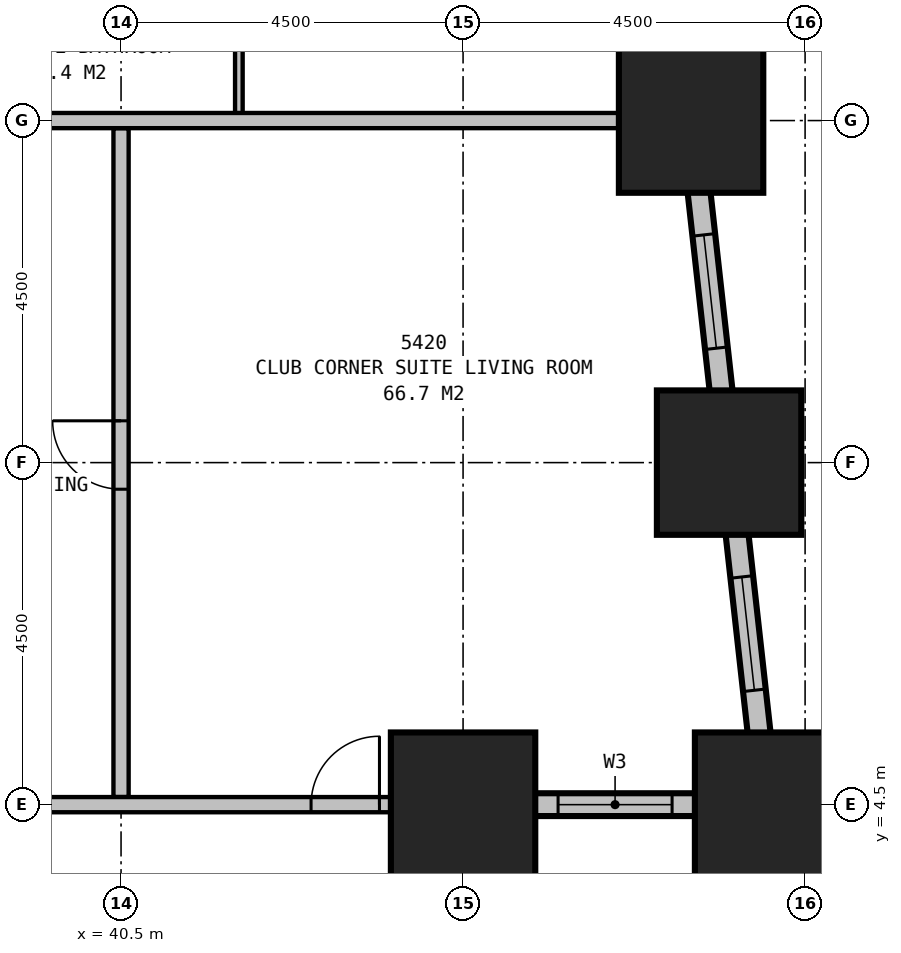
"""IFC4 building model, lengths in metres.
Left out: names, types, materials, properties, quantities, classifications, styles, units other than length and angle.
Written with IfcOpenShell. Run it as: python <this file> out.ifc"""

import sys

from ifc_helpers import new_model, si_unit, direction, frame, frame_2d, origin, origin_2d, place, context, subcontext, project, spatial, rectangle, extrude, element, fill, save


model = new_model("IFC4")
c1 = context("Model", 3, precision=1e-05, world=origin(), true_north=direction((0.0, 1.0)))
c2 = subcontext(c1, "Body", "Model", "MODEL_VIEW")
j1 = project(units=[si_unit("LENGTHUNIT", "METRE"), si_unit("PLANEANGLEUNIT", "RADIAN")], contexts=[c1])
p1 = place(None, origin())
s1 = spatial("IfcSite", under=j1, at=p1, CompositionType="ELEMENT")
p2 = place(p1, origin())
s2 = spatial("IfcBuilding", under=s1, at=p2, CompositionType="ELEMENT")
p3 = place(p2, frame((0.0, 0.0, 207.9)))
s3 = spatial("IfcBuildingStorey", under=s2, at=p3, CompositionType="ELEMENT", Elevation=207.9)
for number, where, z_axis, x_axis in (
    (1, (45.0, 4.5, 0.0), (0.0, 0.0, 1.0), (1.0, 0.0, 0.0)),
    (2, (49.0, 4.5, 0.0), (0.0, 0.0, 1.0), (1.0, 0.0, 0.0)),
    (3, (48.5, 9.0, 0.0), (0.0, 0.0, 1.0), (1.0, 0.0, 0.0)),
    (4, (48.0, 13.5, 0.0), (0.0, 0.0, 1.0), (1.0, 0.0, 0.0)),
):
    element("IfcColumn", number, at=place(p3, frame(where, z_axis=z_axis, x_axis=x_axis)), inside=s3, PredefinedType="COLUMN", context=c2, shape_type="SweptSolid", body=[
        extrude(rectangle(XDim=1.9, YDim=1.9, at=origin_2d()), origin(), (0.0, 0.0, 1.0), 3.5),
    ])
p4 = place(p3, frame((45.0, -0.15, 0.0), z_axis=(0.0, 0.0, 1.0), x_axis=(0.0, 1.0, 0.0)))
e5 = element("IfcWall", 5, at=p4, inside=s3, PredefinedType="STANDARD", context=c2, shape_type="SweptSolid", body=[
    extrude(rectangle(XDim=4.8, YDim=0.3, at=frame_2d((2.4, 0.0))), origin(), (0.0, 0.0, 1.0), 1.9),
])
p5 = place(p4, frame((1.65, 0.0, 0.5)))
e6 = element("IfcOpeningElement", 6, at=p5, cuts=e5, PredefinedType="OPENING", context=c2, shape_type="SweptSolid", body=[
    extrude(rectangle(XDim=1.5, YDim=1.2, at=frame_2d((0.75, 0.6))), frame((0.0, 0.16, 0.0), z_axis=(0.0, -1.0, 0.0), x_axis=(1.0, 0.0, 0.0)), (0.0, 0.0, 1.0), 0.32),
])
p6 = place(p3, frame((44.85, 4.5, 0.0), z_axis=(0.0, 0.0, 1.0), x_axis=(1.0, 0.0, 0.0)))
e7 = element("IfcWall", 7, at=p6, inside=s3, PredefinedType="STANDARD", context=c2, shape_type="SweptSolid", body=[
    extrude(rectangle(XDim=4.3, YDim=0.3, at=frame_2d((2.15, 0.0))), origin(), (0.0, 0.0, 1.0), 1.9),
])
p7 = place(p6, frame((1.4, 0.0, 0.5)))
e8 = element("IfcOpeningElement", 8, at=p7, cuts=e7, PredefinedType="OPENING", context=c2, shape_type="SweptSolid", body=[
    extrude(rectangle(XDim=1.5, YDim=1.2, at=frame_2d((0.75, 0.6))), frame((0.0, 0.16, 0.0), z_axis=(0.0, -1.0, 0.0), x_axis=(1.0, 0.0, 0.0)), (0.0, 0.0, 1.0), 0.32),
])
p8 = place(p3, frame((49.017, 4.351, 0.0), z_axis=(0.0, 0.0, 1.0), x_axis=(-0.110433201132, 0.993883548555, 0.0)))
e9 = element("IfcWall", 9, at=p8, inside=s3, PredefinedType="STANDARD", context=c2, shape_type="SweptSolid", body=[
    extrude(rectangle(XDim=31.994, YDim=0.3, at=frame_2d((15.997, 0.0))), origin(), (0.0, 0.0, 1.0), 1.9),
])
p9 = place(p8, frame((1.664, 0.0, 0.5)))
e10 = element("IfcOpeningElement", 10, at=p9, cuts=e9, PredefinedType="OPENING", context=c2, shape_type="SweptSolid", body=[
    extrude(rectangle(XDim=1.5, YDim=1.2, at=frame_2d((0.75, 0.6))), frame((0.0, 0.16, 0.0), z_axis=(0.0, -1.0, 0.0), x_axis=(1.0, 0.0, 0.0)), (0.0, 0.0, 1.0), 0.32),
])
p10 = place(p8, frame((6.192, 0.0, 0.5)))
e11 = element("IfcOpeningElement", 11, at=p10, cuts=e9, PredefinedType="OPENING", context=c2, shape_type="SweptSolid", body=[
    extrude(rectangle(XDim=1.5, YDim=1.2, at=frame_2d((0.75, 0.6))), frame((0.0, 0.16, 0.0), z_axis=(0.0, -1.0, 0.0), x_axis=(1.0, 0.0, 0.0)), (0.0, 0.0, 1.0), 0.32),
])
p11 = place(p8, frame((10.719, 0.0, 0.5)))
e12 = element("IfcOpeningElement", 12, at=p11, cuts=e9, PredefinedType="OPENING", context=c2, shape_type="SweptSolid", body=[
    extrude(rectangle(XDim=1.5, YDim=1.2, at=frame_2d((0.75, 0.6))), frame((0.0, 0.16, 0.0), z_axis=(0.0, -1.0, 0.0), x_axis=(1.0, 0.0, 0.0)), (0.0, 0.0, 1.0), 0.32),
])
p12 = place(p8, frame((15.247, 0.0, 0.5)))
e13 = element("IfcOpeningElement", 13, at=p12, cuts=e9, PredefinedType="OPENING", context=c2, shape_type="SweptSolid", body=[
    extrude(rectangle(XDim=1.5, YDim=1.2, at=frame_2d((0.75, 0.6))), frame((0.0, 0.16, 0.0), z_axis=(0.0, -1.0, 0.0), x_axis=(1.0, 0.0, 0.0)), (0.0, 0.0, 1.0), 0.32),
])
p13 = place(p8, frame((19.775, 0.0, 0.5)))
e14 = element("IfcOpeningElement", 14, at=p13, cuts=e9, PredefinedType="OPENING", context=c2, shape_type="SweptSolid", body=[
    extrude(rectangle(XDim=1.5, YDim=1.2, at=frame_2d((0.75, 0.6))), frame((0.0, 0.16, 0.0), z_axis=(0.0, -1.0, 0.0), x_axis=(1.0, 0.0, 0.0)), (0.0, 0.0, 1.0), 0.32),
])
p14 = place(p8, frame((24.302, 0.0, 0.5)))
e15 = element("IfcOpeningElement", 15, at=p14, cuts=e9, PredefinedType="OPENING", context=c2, shape_type="SweptSolid", body=[
    extrude(rectangle(XDim=1.5, YDim=1.2, at=frame_2d((0.75, 0.6))), frame((0.0, 0.16, 0.0), z_axis=(0.0, -1.0, 0.0), x_axis=(1.0, 0.0, 0.0)), (0.0, 0.0, 1.0), 0.32),
])
p15 = place(p8, frame((28.83, 0.0, 0.5)))
e16 = element("IfcOpeningElement", 16, at=p15, cuts=e9, PredefinedType="OPENING", context=c2, shape_type="SweptSolid", body=[
    extrude(rectangle(XDim=1.5, YDim=1.2, at=frame_2d((0.75, 0.6))), frame((0.0, 0.16, 0.0), z_axis=(0.0, -1.0, 0.0), x_axis=(1.0, 0.0, 0.0)), (0.0, 0.0, 1.0), 0.32),
])
p16 = place(p3, frame((42.05, 13.5, 0.0), z_axis=(0.0, 0.0, 1.0), x_axis=(0.0, 1.0, 0.0)))
e17 = element("IfcWall", 17, at=p16, inside=s3, PredefinedType="PLUMBINGWALL", context=c2, shape_type="SweptSolid", body=[
    extrude(rectangle(XDim=2.8, YDim=0.1, at=frame_2d((1.4, 0.0))), origin(), (0.0, 0.0, 1.0), 3.25),
])
p17 = place(p3, frame((38.3, 13.5, 0.0), z_axis=(0.0, 0.0, 1.0), x_axis=(1.0, 0.0, 0.0)))
e18 = element("IfcWall", 18, at=p17, inside=s3, PredefinedType="PARTITIONING", context=c2, shape_type="SweptSolid", body=[
    extrude(rectangle(XDim=9.921, YDim=0.2, at=frame_2d((4.96, 0.0))), origin(), (0.0, 0.0, 1.0), 1.9),
])
p18 = place(p3, frame((35.9, 4.5, 0.0), z_axis=(0.0, 0.0, 1.0), x_axis=(1.0, 0.0, 0.0)))
e19 = element("IfcWall", 19, at=p18, inside=s3, PredefinedType="PARTITIONING", context=c2, shape_type="SweptSolid", body=[
    extrude(rectangle(XDim=9.1, YDim=0.2, at=frame_2d((4.55, 0.0))), origin(), (0.0, 0.0, 1.0), 3.25),
])
p19 = place(p18, frame((7.1, 0.0, 0.0)))
e20 = element("IfcOpeningElement", 20, at=p19, cuts=e19, PredefinedType="OPENING", context=c2, shape_type="SweptSolid", body=[
    extrude(rectangle(XDim=0.9, YDim=2.1, at=frame_2d((0.45, 1.05))), frame((0.0, 0.11, 0.0), z_axis=(0.0, -1.0, 0.0), x_axis=(1.0, 0.0, 0.0)), (0.0, 0.0, 1.0), 0.22),
])
p20 = place(p3, frame((40.5, 4.6, 0.0), z_axis=(0.0, 0.0, 1.0), x_axis=(0.0, 1.0, 0.0)))
e21 = element("IfcWall", 21, at=p20, inside=s3, PredefinedType="PARTITIONING", context=c2, shape_type="SweptSolid", body=[
    extrude(rectangle(XDim=8.8, YDim=0.2, at=frame_2d((4.4, 0.0))), origin(), (0.0, 0.0, 1.0), 2.2),
])
p21 = place(p20, frame((4.05, 0.0, 0.0)))
e22 = element("IfcOpeningElement", 22, at=p21, cuts=e21, PredefinedType="OPENING", context=c2, shape_type="SweptSolid", body=[
    extrude(rectangle(XDim=0.9, YDim=2.1, at=frame_2d((0.45, 1.05))), frame((0.0, 0.11, 0.0), z_axis=(0.0, -1.0, 0.0), x_axis=(1.0, 0.0, 0.0)), (0.0, 0.0, 1.0), 0.22),
])
p22 = place(p7, origin())
e23 = element("IfcWindow", 23, at=p22, inside=s3, PartitioningType="SINGLE_PANEL", PredefinedType="WINDOW", context=c2, shape_type="SweptSolid", body=[
    extrude(rectangle(XDim=1.5, YDim=1.2, at=frame_2d((0.75, 0.6))), frame((0.0, 0.03, 0.0), z_axis=(0.0, -1.0, 0.0), x_axis=(1.0, 0.0, 0.0)), (0.0, 0.0, 1.0), 0.06),
])
fill(e8, e23)
p23 = place(p9, origin())
e24 = element("IfcWindow", 24, at=p23, inside=s3, PartitioningType="SINGLE_PANEL", PredefinedType="WINDOW", context=c2, shape_type="SweptSolid", body=[
    extrude(rectangle(XDim=1.5, YDim=1.2, at=frame_2d((0.75, 0.6))), frame((0.0, 0.03, 0.0), z_axis=(0.0, -1.0, 0.0), x_axis=(1.0, 0.0, 0.0)), (0.0, 0.0, 1.0), 0.06),
])
fill(e10, e24)
p24 = place(p10, origin())
e25 = element("IfcWindow", 25, at=p24, inside=s3, PartitioningType="SINGLE_PANEL", PredefinedType="WINDOW", context=c2, shape_type="SweptSolid", body=[
    extrude(rectangle(XDim=1.5, YDim=1.2, at=frame_2d((0.75, 0.6))), frame((0.0, 0.03, 0.0), z_axis=(0.0, -1.0, 0.0), x_axis=(1.0, 0.0, 0.0)), (0.0, 0.0, 1.0), 0.06),
])
fill(e11, e25)
p25 = place(p19, origin())
e26 = element("IfcDoor", 26, at=p25, inside=s3, OperationType="SINGLE_SWING_RIGHT", PredefinedType="DOOR", context=c2, shape_type="SweptSolid", body=[
    extrude(rectangle(XDim=0.9, YDim=2.1, at=frame_2d((0.45, 1.05))), frame((0.0, 0.025, 0.0), z_axis=(0.0, -1.0, 0.0), x_axis=(1.0, 0.0, 0.0)), (0.0, 0.0, 1.0), 0.05),
])
fill(e20, e26)
p26 = place(p21, origin())
e27 = element("IfcDoor", 27, at=p26, inside=s3, OperationType="SINGLE_SWING_RIGHT", PredefinedType="DOOR", context=c2, shape_type="SweptSolid", body=[
    extrude(rectangle(XDim=0.9, YDim=2.1, at=frame_2d((0.45, 1.05))), frame((0.0, 0.025, 0.0), z_axis=(0.0, -1.0, 0.0), x_axis=(1.0, 0.0, 0.0)), (0.0, 0.0, 1.0), 0.05),
])
fill(e22, e27)
save(model, sys.argv[1])
